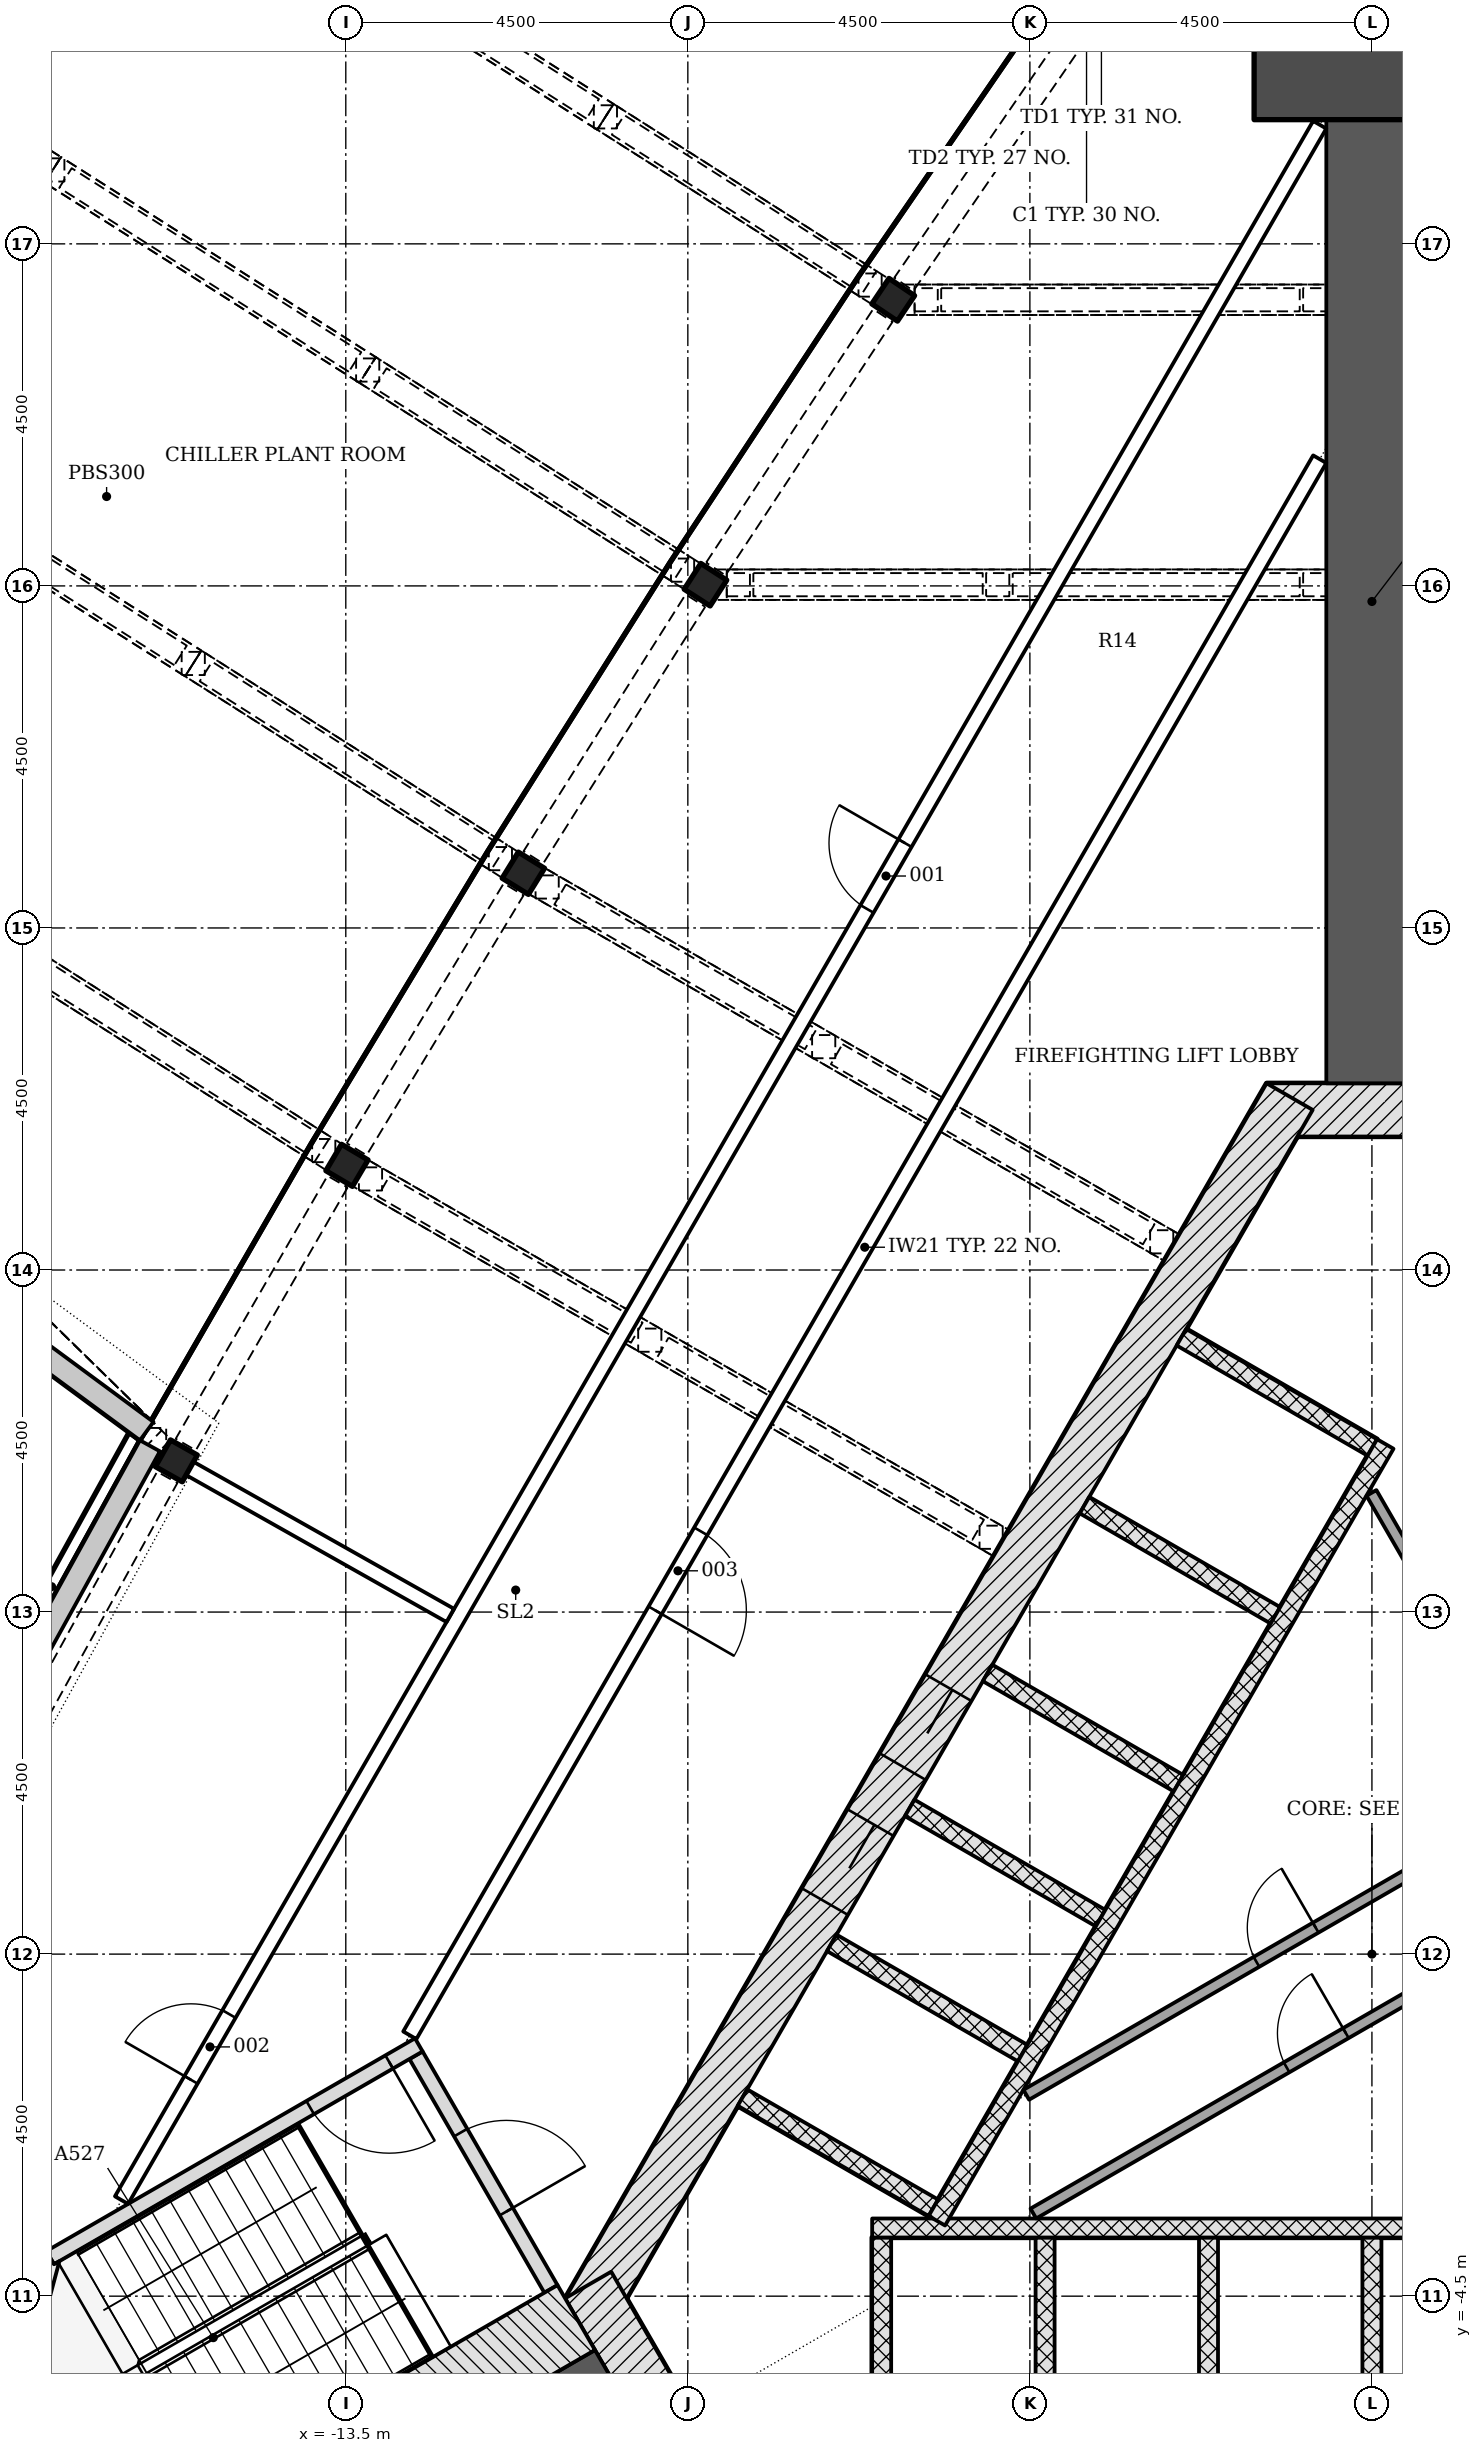
"""IFC4 building model, lengths in metres.
Left out: names, types, materials, properties, quantities, classifications, styles, units other than length and angle.
Written with IfcOpenShell. Run it as: python <this file> out.ifc"""

import sys

from ifc_helpers import new_model, si_unit, direction, frame, frame_2d, origin, origin_2d, place, context, subcontext, project, spatial, polyline, rectangle, i_section, outline, extrude, element, fill, save


model = new_model("IFC4")
c1 = context("Model", 3, precision=1e-05, world=origin(), true_north=direction((0.0, 1.0)))
c2 = subcontext(c1, "Body", "Model", "MODEL_VIEW")
j1 = project(units=[si_unit("LENGTHUNIT", "METRE"), si_unit("PLANEANGLEUNIT", "RADIAN")], contexts=[c1])
p1 = place(None, origin())
s1 = spatial("IfcSite", under=j1, at=p1, CompositionType="ELEMENT")
p2 = place(p1, origin())
s2 = spatial("IfcBuilding", under=s1, at=p2, CompositionType="ELEMENT")
p3 = place(p2, frame((0.0, 0.0, 87.0)))
s3 = spatial("IfcBuildingStorey", under=s2, at=p3, CompositionType="ELEMENT", Elevation=87.0)
p4 = place(p3, frame((1.386, 11.106, -0.3), z_axis=(0.0, 0.0, 1.0), x_axis=(-1.0, 0.0, 0.0)))
e1 = element("IfcWall", 1, at=p4, inside=s3, PredefinedType="SHEAR", context=c2, shape_type="SweptSolid", body=[
    extrude(rectangle(XDim=2.771, YDim=0.7, at=frame_2d((1.386, 0.0))), origin(), (0.0, 0.0, 1.0), 4.6),
])
p5 = place(p3, frame((-1.083, 11.281, -0.3), z_axis=(0.0, 0.0, 1.0), x_axis=(-0.500001446645, -0.866024568562, 0.0)))
e2 = element("IfcWall", 2, at=p5, inside=s3, PredefinedType="SHEAR", context=c2, shape_type="SweptSolid", body=[
    extrude(rectangle(XDim=18.458, YDim=0.7, at=frame_2d((9.229, 0.0))), origin(), (0.0, 0.0, 1.0), 4.6),
])
p6 = place(p5, frame((8.979, 0.0, 0.3)))
e3 = element("IfcOpeningElement", 3, at=p6, cuts=e2, PredefinedType="OPENING", context=c2, shape_type="SweptSolid", body=[
    extrude(rectangle(XDim=1.2, YDim=2.1, at=frame_2d((0.6, 1.05))), frame((0.0, 0.36, 0.0), z_axis=(0.0, -1.0, 0.0), x_axis=(1.0, 0.0, 0.0)), (0.0, 0.0, 1.0), 0.72),
])
p7 = place(p5, frame((11.029, 0.0, 0.3)))
e4 = element("IfcOpeningElement", 4, at=p7, cuts=e2, PredefinedType="OPENING", context=c2, shape_type="SweptSolid", body=[
    extrude(rectangle(XDim=1.2, YDim=2.1, at=frame_2d((0.6, 1.05))), frame((0.0, 0.36, 0.0), z_axis=(0.0, -1.0, 0.0), x_axis=(1.0, 0.0, 0.0)), (0.0, 0.0, 1.0), 0.72),
])
p8 = place(p3, frame((-10.311, -4.353, -0.3), z_axis=(0.0, 0.0, 1.0), x_axis=(0.500042739161, -0.866000726912, 0.0)))
e5 = element("IfcWall", 5, at=p8, inside=s3, PredefinedType="SHEAR", context=c2, shape_type="SweptSolid", body=[
    extrude(rectangle(XDim=2.771, YDim=0.7, at=frame_2d((1.386, 0.0))), origin(), (0.0, 0.0, 1.0), 4.6),
])
p9 = place(p3, frame((0.0, 11.456, -0.3), z_axis=(0.0, 0.0, 1.0), x_axis=(0.0, 1.0, 0.0)))
e6 = element("IfcWall", 6, at=p9, inside=s3, PredefinedType="SHEAR", context=c2, shape_type="SweptSolid", body=[
    extrude(rectangle(XDim=12.678, YDim=1.2, at=frame_2d((6.339, 0.0))), origin(), (0.0, 0.0, 1.0), 4.6),
])
p10 = place(p3, frame((-9.922, -5.728, -0.3), z_axis=(0.0, 0.0, 1.0), x_axis=(-0.866029086277, -0.499993621681, 0.0)))
e7 = element("IfcWall", 7, at=p10, inside=s3, PredefinedType="SHEAR", context=c2, shape_type="SweptSolid", body=[
    extrude(rectangle(XDim=12.677, YDim=1.2, at=frame_2d((6.339, 0.0))), origin(), (0.0, 0.0, 1.0), 4.6),
])
p11 = place(p3, frame((0.0, 25.684, -0.3), z_axis=(0.0, 0.0, 1.0), x_axis=(0.0, 1.0, 0.0)))
e8 = element("IfcColumn", 8, at=p11, inside=s3, PredefinedType="COLUMN", context=c2, shape_type="SweptSolid", body=[
    extrude(rectangle(XDim=3.1, YDim=3.1, at=origin_2d()), origin(), (0.0, 0.0, 1.0), 4.6),
])
for number, where, z_axis, x_axis in (
    (9, (-6.298, 21.765, -0.3), (0.0, 0.0, 1.0), (-0.558, -0.83, 0.0)),
    (10, (-8.768, 18.016, -0.3), (0.0, 0.0, 1.0), (-0.542, -0.84, 0.0)),
    (11, (-11.164, 14.22, -0.3), (0.0, 0.0, 1.0), (-0.525, -0.851, 0.0)),
    (12, (-13.484, 10.377, -0.3), (0.0, 0.0, 1.0), (-0.508, -0.861, 0.0)),
    (13, (-15.729, 6.49, -0.3), (0.0, 0.0, 1.0), (-0.491, -0.871, 0.0)),
):
    element("IfcColumn", number, at=place(p3, frame(where, z_axis=z_axis, x_axis=x_axis)), inside=s3, PredefinedType="COLUMN", context=c2, shape_type="SweptSolid", body=[
        extrude(i_section(OverallWidth=0.404, OverallDepth=0.406, WebThickness=0.027, FlangeThickness=0.044, FilletRadius=0.015, at=origin_2d()), origin(), (0.0, 0.0, 1.0), 4.6),
    ])
p12 = place(p3, origin())
e14 = element("IfcWall", 14, at=p12, inside=s3, PredefinedType="NOTDEFINED", context=c2, shape_type="SweptSolid", body=[
    extrude(outline(polyline([(-18.58, 8.509), (-16.208, 6.76), (-16.03, 7.001), (-18.402, 8.75), (-18.58, 8.509)])), origin(), (0.0, 0.0, 1.0), 1.2),
])
p13 = place(p3, origin())
e15 = element("IfcWall", 15, at=p13, inside=s3, PredefinedType="NOTDEFINED", context=c2, shape_type="SweptSolid", body=[
    extrude(outline(polyline([(-16.208, 6.76), (-18.381, 2.819), (-18.118, 2.674), (-15.945, 6.615), (-16.208, 6.76)])), origin(), (0.0, 0.0, 1.0), 1.2),
])
for number, where, z_axis, x_axis in (
    (16, (-6.45, -6.228, -0.3), (0.0, 0.0, 1.0), (0.0, 1.0, 0.0)),
    (17, (-4.3, -6.228, -0.3), (0.0, 0.0, 1.0), (0.0, 1.0, 0.0)),
    (18, (-2.15, -6.228, -0.3), (0.0, 0.0, 1.0), (0.0, 1.0, 0.0)),
    (19, (0.0, -6.228, -0.3), (0.0, 0.0, 1.0), (0.0, 1.0, 0.0)),
):
    element("IfcWall", number, at=place(p3, frame(where, z_axis=z_axis, x_axis=x_axis)), inside=s3, PredefinedType="PARTITIONING", context=c2, shape_type="SweptSolid", body=[
        extrude(rectangle(XDim=2.5, YDim=0.25, at=frame_2d((1.25, 0.0))), origin(), (0.0, 0.0, 1.0), 4.6),
    ])
p14 = place(p3, frame((-6.575, -3.603, 0.0), z_axis=(0.0, 0.0, 1.0), x_axis=(1.0, 0.0, 0.0)))
e20 = element("IfcWall", 20, at=p14, inside=s3, PredefinedType="PARTITIONING", context=c2, shape_type="SweptSolid", body=[
    extrude(rectangle(XDim=13.15, YDim=0.25, at=frame_2d((6.575, 0.0))), origin(), (0.0, 0.0, 1.0), 4.3),
])
p15 = place(p3, frame((-2.506, 8.115, -0.3), z_axis=(0.0, 0.0, 1.0), x_axis=(0.865996321171, -0.50005036918, 0.0)))
e21 = element("IfcWall", 21, at=p15, inside=s3, PredefinedType="PARTITIONING", context=c2, shape_type="SweptSolid", body=[
    extrude(rectangle(XDim=2.9, YDim=0.25, at=frame_2d((1.45, 0.0))), origin(), (0.0, 0.0, 1.0), 4.6),
])
for number, where, z_axis, x_axis in (
    (22, (-3.781, 5.907, -0.3), (0.0, 0.0, 1.0), (0.866, -0.5, 0.0)),
    (23, (-5.056, 3.699, -0.3), (0.0, 0.0, 1.0), (0.866, -0.5, 0.0)),
    (24, (-6.081, 1.923, -0.3), (0.0, 0.0, 1.0), (0.866, -0.5, 0.0)),
    (25, (-7.106, 0.148, -0.3), (0.0, 0.0, 1.0), (0.866, -0.5, 0.0)),
    (26, (-8.281, -1.887, -0.3), (0.0, 0.0, 1.0), (0.866, -0.5, 0.0)),
):
    element("IfcWall", number, at=place(p3, frame(where, z_axis=z_axis, x_axis=x_axis)), inside=s3, PredefinedType="PARTITIONING", context=c2, shape_type="SweptSolid", body=[
        extrude(rectangle(XDim=2.9, YDim=0.25, at=frame_2d((1.45, 0.0))), origin(), (0.0, 0.0, 1.0), 4.6),
    ])
p16 = place(p3, frame((0.176, 6.711, 0.0), z_axis=(0.0, 0.0, 1.0), x_axis=(-0.500004227369, -0.866022963098, 0.0)))
e27 = element("IfcWall", 27, at=p16, inside=s3, PredefinedType="PARTITIONING", context=c2, shape_type="SweptSolid", body=[
    extrude(rectangle(XDim=11.8, YDim=0.25, at=frame_2d((5.9, 0.0))), origin(), (0.0, 0.0, 1.0), 4.3),
])
p17 = place(p3, frame((-4.548, -1.851, 0.0), z_axis=(0.0, 0.0, 1.0), x_axis=(0.866023939251, 0.500002536638, 0.0)))
e28 = element("IfcWall", 28, at=p17, inside=s3, PredefinedType="PARTITIONING", context=c2, shape_type="SweptSolid", body=[
    extrude(rectangle(XDim=11.092, YDim=0.15, at=frame_2d((5.546, 0.0))), origin(), (0.0, 0.0, 1.0), 4.3),
])
p18 = place(p17, frame((3.497, 0.0, 0.0)))
e29 = element("IfcOpeningElement", 29, at=p18, cuts=e28, PredefinedType="OPENING", context=c2, shape_type="SweptSolid", body=[
    extrude(rectangle(XDim=0.9, YDim=2.1, at=frame_2d((0.45, 1.05))), frame((0.0, 0.085, 0.0), z_axis=(0.0, -1.0, 0.0), x_axis=(1.0, 0.0, 0.0)), (0.0, 0.0, 1.0), 0.17),
])
p19 = place(p3, frame((2.099, 2.42, 0.0), z_axis=(0.0, 0.0, 1.0), x_axis=(-0.499998449073, 0.866026299211, 0.0)))
e30 = element("IfcWall", 30, at=p19, inside=s3, PredefinedType="PARTITIONING", context=c2, shape_type="SweptSolid", body=[
    extrude(rectangle(XDim=4.211, YDim=0.15, at=frame_2d((2.106, 0.0))), origin(), (0.0, 0.0, 1.0), 4.3),
])
p20 = place(p3, frame((-4.454, -3.413, 0.0), z_axis=(0.0, 0.0, 1.0), x_axis=(0.86603043987, 0.499991277142, 0.0)))
e31 = element("IfcWall", 31, at=p20, inside=s3, PredefinedType="PARTITIONING", context=c2, shape_type="SweptSolid", body=[
    extrude(rectangle(XDim=11.792, YDim=0.15, at=frame_2d((5.896, 0.0))), origin(), (0.0, 0.0, 1.0), 4.3),
])
p21 = place(p20, frame((3.847, 0.0, 0.0)))
e32 = element("IfcOpeningElement", 32, at=p21, cuts=e31, PredefinedType="OPENING", context=c2, shape_type="SweptSolid", body=[
    extrude(rectangle(XDim=0.9, YDim=2.1, at=frame_2d((0.45, 1.05))), frame((0.0, 0.085, 0.0), z_axis=(0.0, -1.0, 0.0), x_axis=(1.0, 0.0, 0.0)), (0.0, 0.0, 1.0), 0.17),
])
p22 = place(p3, frame((-12.576, -1.331, -0.3), z_axis=(0.0, 0.0, 1.0), x_axis=(0.499970499736, -0.8660424351, 0.0)))
e33 = element("IfcWall", 33, at=p22, inside=s3, PredefinedType="SHEAR", context=c2, shape_type="SweptSolid", body=[
    extrude(rectangle(XDim=3.55, YDim=0.2, at=frame_2d((1.775, 0.0))), origin(), (0.0, 0.0, 1.0), 4.6),
])
p23 = place(p22, frame((1.175, 0.0, 0.3)))
e34 = element("IfcOpeningElement", 34, at=p23, cuts=e33, PredefinedType="OPENING", context=c2, shape_type="SweptSolid", body=[
    extrude(rectangle(XDim=1.2, YDim=2.1, at=frame_2d((0.6, 1.05))), frame((0.0, 0.11, 0.0), z_axis=(0.0, -1.0, 0.0), x_axis=(1.0, 0.0, 0.0)), (0.0, 0.0, 1.0), 0.22),
])
p24 = place(p3, frame((-12.539, -1.194, -0.3), z_axis=(0.0, 0.0, 1.0), x_axis=(-0.866045472092, -0.499965239061, 0.0)))
e35 = element("IfcWall", 35, at=p24, inside=s3, PredefinedType="SHEAR", context=c2, shape_type="SweptSolid", body=[
    extrude(rectangle(XDim=5.6, YDim=0.2, at=frame_2d((2.8, 0.0))), origin(), (0.0, 0.0, 1.0), 4.6),
])
p25 = place(p24, frame((0.45, 0.0, 0.3)))
e36 = element("IfcOpeningElement", 36, at=p25, cuts=e35, PredefinedType="OPENING", context=c2, shape_type="SweptSolid", body=[
    extrude(rectangle(XDim=1.2, YDim=2.1, at=frame_2d((0.6, 1.05))), frame((0.0, 0.11, 0.0), z_axis=(0.0, -1.0, 0.0), x_axis=(1.0, 0.0, 0.0)), (0.0, 0.0, 1.0), 0.22),
])
p26 = place(p3, frame((-10.468, -4.782, -0.3), z_axis=(0.0, 0.0, 1.0), x_axis=(-0.866018442252, -0.500012057535, 0.0)))
e37 = element("IfcWall", 37, at=p26, inside=s3, PredefinedType="SHEAR", context=c2, shape_type="SweptSolid", body=[
    extrude(rectangle(XDim=7.2, YDim=0.986, at=frame_2d((3.6, 0.0))), origin(), (0.0, 0.0, 1.0), 4.6),
])
p27 = place(p3, frame((0.0, 0.0, -0.3)))
e38 = element("IfcWall", 38, at=p27, inside=s3, PredefinedType="SHEAR", context=c2, shape_type="SweptSolid", body=[
    extrude(outline(polyline([(-17.439, -3.907), (-18.025, -6.093), (-16.95, -7.955), (-16.777, -7.855), (-17.81, -6.065), (-17.267, -4.039), (-17.339, -4.081), (-17.339, -4.081), (-17.339, -4.081), (-17.339, -4.081), (-17.339, -4.081), (-17.339, -4.081), (-17.339, -4.081), (-17.339, -4.081), (-17.339, -4.081), (-17.339, -4.081), (-17.339, -4.081), (-17.339, -4.081), (-17.339, -4.081), (-17.339, -4.081), (-17.339, -4.081), (-17.339, -4.081), (-17.339, -4.081), (-17.439, -3.907)])), origin(), (0.0, 0.0, 1.0), 4.6),
])
p28 = place(p3, frame((-0.687, 19.667, 0.0), z_axis=(0.0, 0.0, 1.0), x_axis=(-0.500000491645, -0.866025119933, 0.0)))
e39 = element("IfcWall", 39, at=p28, inside=s3, PredefinedType="PARTITIONING", context=c2, shape_type="SweptSolid", body=[
    extrude(rectangle(XDim=23.943, YDim=0.2, at=frame_2d((11.971, 0.0))), origin(), (0.0, 0.0, 1.0), 3.678),
])
p29 = place(p28, frame((16.287, 0.0, 0.0)))
e40 = element("IfcOpeningElement", 40, at=p29, cuts=e39, PredefinedType="OPENING", context=c2, shape_type="SweptSolid", body=[
    extrude(rectangle(XDim=1.2, YDim=2.1, at=frame_2d((0.6, 1.05))), frame((0.0, 0.11, 0.0), z_axis=(0.0, -1.0, 0.0), x_axis=(1.0, 0.0, 0.0)), (0.0, 0.0, 1.0), 0.22),
])
p30 = place(p3, frame((-16.45, -3.237, 0.0), z_axis=(0.0, 0.0, 1.0), x_axis=(0.499997734893, 0.866026711541, 0.0)))
e41 = element("IfcWall", 41, at=p30, inside=s3, PredefinedType="PARTITIONING", context=c2, shape_type="SweptSolid", body=[
    extrude(rectangle(XDim=31.527, YDim=0.2, at=frame_2d((15.764, 0.0))), origin(), (0.0, 0.0, 1.0), 3.678),
])
p31 = place(p30, frame((19.615, 0.0, 0.0)))
e42 = element("IfcOpeningElement", 42, at=p31, cuts=e41, PredefinedType="OPENING", context=c2, shape_type="SweptSolid", body=[
    extrude(rectangle(XDim=1.0, YDim=2.1, at=frame_2d((0.5, 1.05))), frame((0.0, 0.11, 0.0), z_axis=(0.0, -1.0, 0.0), x_axis=(1.0, 0.0, 0.0)), (0.0, 0.0, 1.0), 0.22),
])
p32 = place(p30, frame((1.828, 0.0, 0.0)))
e43 = element("IfcOpeningElement", 43, at=p32, cuts=e41, PredefinedType="OPENING", context=c2, shape_type="SweptSolid", body=[
    extrude(rectangle(XDim=1.0, YDim=2.1, at=frame_2d((0.5, 1.05))), frame((0.0, 0.11, 0.0), z_axis=(0.0, -1.0, 0.0), x_axis=(1.0, 0.0, 0.0)), (0.0, 0.0, 1.0), 0.22),
])
p33 = place(p3, frame((-15.598, 6.416, 0.0), z_axis=(0.0, 0.0, 1.0), x_axis=(0.870920683573, -0.491423608433, 0.0)))
e44 = element("IfcWall", 44, at=p33, inside=s3, PredefinedType="PARTITIONING", context=c2, shape_type="SweptSolid", body=[
    extrude(rectangle(XDim=3.987, YDim=0.2, at=frame_2d((1.994, 0.0))), origin(), (0.0, 0.0, 1.0), 3.678),
])
p34 = place(p6, origin())
e45 = element("IfcDoor", 45, at=p34, inside=s3, OperationType="DOUBLE_DOOR_SLIDING", PredefinedType="DOOR", context=c2, shape_type="SweptSolid", body=[
    extrude(rectangle(XDim=1.2, YDim=2.1, at=frame_2d((0.6, 1.05))), frame((0.0, 0.025, 0.0), z_axis=(0.0, -1.0, 0.0), x_axis=(1.0, 0.0, 0.0)), (0.0, 0.0, 1.0), 0.05),
])
fill(e3, e45)
p35 = place(p7, origin())
e46 = element("IfcDoor", 46, at=p35, inside=s3, OperationType="DOUBLE_DOOR_SLIDING", PredefinedType="DOOR", context=c2, shape_type="SweptSolid", body=[
    extrude(rectangle(XDim=1.2, YDim=2.1, at=frame_2d((0.6, 1.05))), frame((0.0, 0.025, 0.0), z_axis=(0.0, -1.0, 0.0), x_axis=(1.0, 0.0, 0.0)), (0.0, 0.0, 1.0), 0.05),
])
fill(e4, e46)
p36 = place(p21, origin())
e47 = element("IfcDoor", 47, at=p36, inside=s3, OperationType="SINGLE_SWING_RIGHT", PredefinedType="DOOR", context=c2, shape_type="SweptSolid", body=[
    extrude(rectangle(XDim=0.9, YDim=2.1, at=frame_2d((0.45, 1.05))), frame((0.0, 0.025, 0.0), z_axis=(0.0, -1.0, 0.0), x_axis=(1.0, 0.0, 0.0)), (0.0, 0.0, 1.0), 0.05),
])
fill(e32, e47)
p37 = place(p18, origin())
e48 = element("IfcDoor", 48, at=p37, inside=s3, OperationType="SINGLE_SWING_RIGHT", PredefinedType="DOOR", context=c2, shape_type="SweptSolid", body=[
    extrude(rectangle(XDim=0.9, YDim=2.1, at=frame_2d((0.45, 1.05))), frame((0.0, 0.025, 0.0), z_axis=(0.0, -1.0, 0.0), x_axis=(1.0, 0.0, 0.0)), (0.0, 0.0, 1.0), 0.05),
])
fill(e29, e48)
p38 = place(p23, origin())
e49 = element("IfcDoor", 49, at=p38, inside=s3, OperationType="SINGLE_SWING_RIGHT", PredefinedType="DOOR", context=c2, shape_type="SweptSolid", body=[
    extrude(rectangle(XDim=1.2, YDim=2.1, at=frame_2d((0.6, 1.05))), frame((0.0, 0.025, 0.0), z_axis=(0.0, -1.0, 0.0), x_axis=(1.0, 0.0, 0.0)), (0.0, 0.0, 1.0), 0.05),
])
fill(e34, e49)
p39 = place(p25, origin())
e50 = element("IfcDoor", 50, at=p39, inside=s3, OperationType="SINGLE_SWING_LEFT", PredefinedType="DOOR", context=c2, shape_type="SweptSolid", body=[
    extrude(rectangle(XDim=1.2, YDim=2.1, at=frame_2d((0.6, 1.05))), frame((0.0, 0.025, 0.0), z_axis=(0.0, -1.0, 0.0), x_axis=(1.0, 0.0, 0.0)), (0.0, 0.0, 1.0), 0.05),
])
fill(e36, e50)
p40 = place(p31, origin())
e51 = element("IfcDoor", 51, at=p40, inside=s3, OperationType="SINGLE_SWING_RIGHT", PredefinedType="DOOR", context=c2, shape_type="SweptSolid", body=[
    extrude(rectangle(XDim=1.0, YDim=2.1, at=frame_2d((0.5, 1.05))), frame((0.0, 0.025, 0.0), z_axis=(0.0, -1.0, 0.0), x_axis=(1.0, 0.0, 0.0)), (0.0, 0.0, 1.0), 0.05),
])
fill(e42, e51)
p41 = place(p32, origin())
e52 = element("IfcDoor", 52, at=p41, inside=s3, OperationType="SINGLE_SWING_LEFT", PredefinedType="DOOR", context=c2, shape_type="SweptSolid", body=[
    extrude(rectangle(XDim=1.0, YDim=2.1, at=frame_2d((0.5, 1.05))), frame((0.0, 0.025, 0.0), z_axis=(0.0, -1.0, 0.0), x_axis=(1.0, 0.0, 0.0)), (0.0, 0.0, 1.0), 0.05),
])
fill(e43, e52)
p42 = place(p29, origin())
e53 = element("IfcDoor", 53, at=p42, inside=s3, OperationType="SINGLE_SWING_RIGHT", PredefinedType="DOOR", context=c2, shape_type="SweptSolid", body=[
    extrude(rectangle(XDim=1.2, YDim=2.1, at=frame_2d((0.6, 1.05))), frame((0.0, 0.025, 0.0), z_axis=(0.0, -1.0, 0.0), x_axis=(1.0, 0.0, 0.0)), (0.0, 0.0, 1.0), 0.05),
])
fill(e40, e53)
save(model, sys.argv[1])
